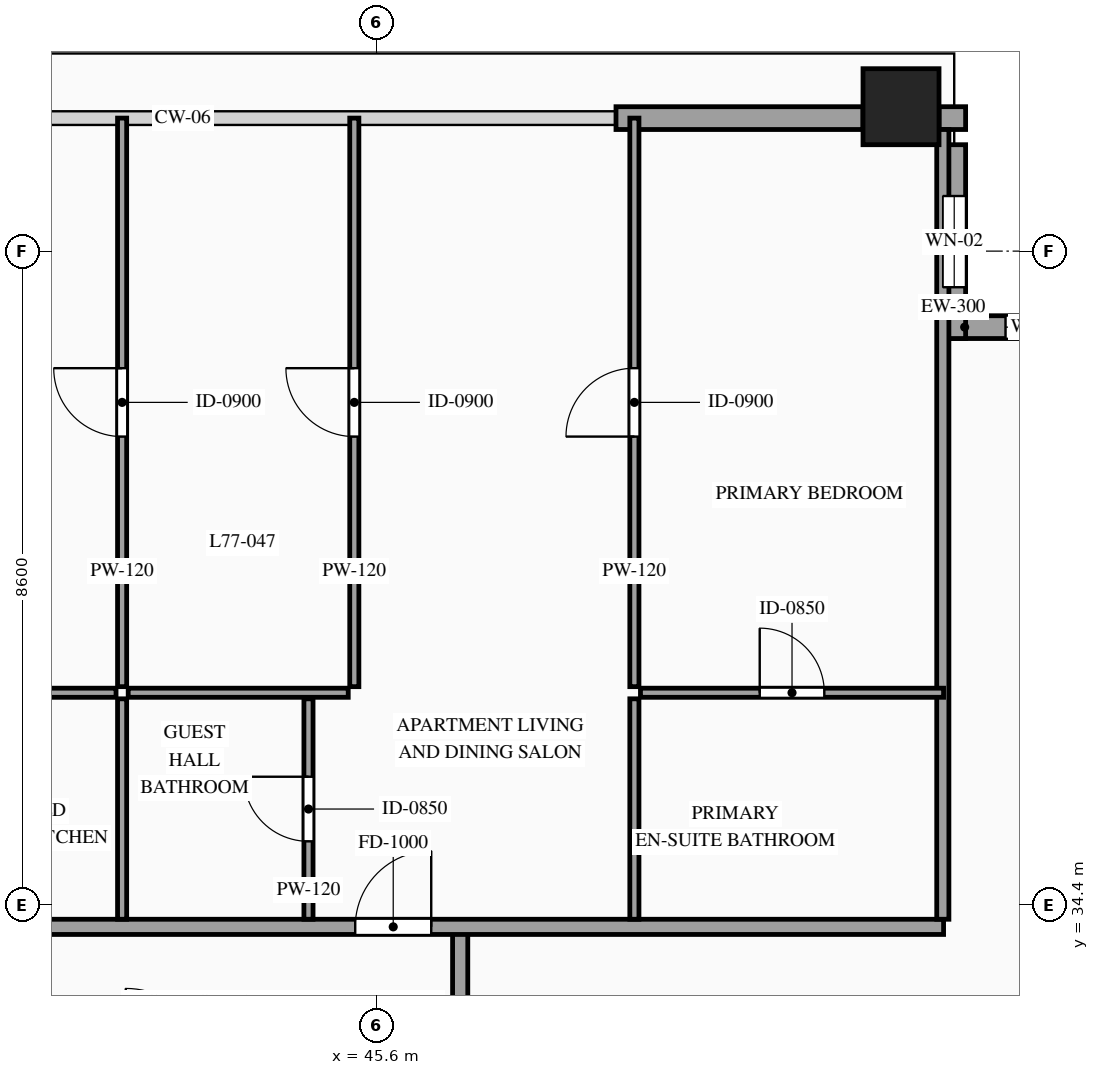
"""IFC4 building model, lengths in metres.
Left out: names, types, materials, properties, quantities, classifications, styles, units other than length and angle.
Written with IfcOpenShell. Run it as: python <this file> out.ifc"""

import sys

from ifc_helpers import new_model, si_unit, direction, frame, frame_2d, origin, origin_2d, place, context, subcontext, project, spatial, rectangle, hollow_rectangle, extrude, source, transform, mapped, element, fill, save


model = new_model("IFC4")
c1 = context("Model", 3, precision=1e-05, world=origin(), true_north=direction((0.0, 1.0)))
c2 = subcontext(c1, "Body", "Model", "MODEL_VIEW")
j1 = project(units=[si_unit("LENGTHUNIT", "METRE"), si_unit("PLANEANGLEUNIT", "RADIAN")], contexts=[c1])
p1 = place(None, origin())
s1 = spatial("IfcSite", under=j1, at=p1, CompositionType="ELEMENT")
p2 = place(p1, origin())
s2 = spatial("IfcBuilding", under=s1, at=p2, CompositionType="ELEMENT")
p3 = place(p2, frame((0.0, 0.0, 289.1)))
s3 = spatial("IfcBuildingStorey", under=s2, at=p3, CompositionType="ELEMENT", Elevation=289.1)
m1 = source(origin(), c2, "Body", "SweptSolid", [
    extrude(hollow_rectangle(XDim=1.0, YDim=1.0, WallThickness=0.048, at=origin_2d()), origin(), (0.0, 0.0, 1.0), 3.5),
])
p4 = place(p3, frame((52.5, 44.9, 0.0), z_axis=(0.0, 0.0, 1.0), x_axis=(1.0, 0.0, 0.0)))
e1 = element("IfcColumn", 1, at=p4, inside=s3, PredefinedType="COLUMN", context=c2, shape_type="MappedRepresentation", body=[
    mapped(m1, transform((0.0, 0.0, 0.0), scale=1.0)),
])
p5 = place(p3, frame((55.6, 42.0, 0.0), z_axis=(0.0, 0.0, 1.0), x_axis=(-1.0, 0.0, 0.0)))
e2 = element("IfcWall", 2, at=p5, inside=s3, PredefinedType="SOLIDWALL", context=c2, shape_type="SweptSolid", body=[
    extrude(rectangle(XDim=2.55, YDim=0.3, at=frame_2d((1.275, 0.0))), origin(), (0.0, 0.0, 1.0), 3.28),
])
p6 = place(p5, frame((0.825, 0.0, 0.85)))
e3 = element("IfcOpeningElement", 3, at=p6, cuts=e2, PredefinedType="OPENING", context=c2, shape_type="SweptSolid", body=[
    extrude(rectangle(XDim=0.9, YDim=1.5, at=frame_2d((0.45, 0.75))), frame((0.0, 0.165, 0.0), z_axis=(0.0, -1.0, 0.0), x_axis=(1.0, 0.0, 0.0)), (0.0, 0.0, 1.0), 0.33),
])
p7 = place(p3, frame((53.2, 41.85, 0.0), z_axis=(0.0, 0.0, 1.0), x_axis=(0.0, 1.0, 0.0)))
e4 = element("IfcWall", 4, at=p7, inside=s3, PredefinedType="SOLIDWALL", context=c2, shape_type="SweptSolid", body=[
    extrude(rectangle(XDim=2.55, YDim=0.3, at=frame_2d((1.275, 0.0))), origin(), (0.0, 0.0, 1.0), 3.28),
])
p8 = place(p7, frame((0.675, 0.0, 0.85)))
e5 = element("IfcOpeningElement", 5, at=p8, cuts=e4, PredefinedType="OPENING", context=c2, shape_type="SweptSolid", body=[
    extrude(rectangle(XDim=1.2, YDim=2.1, at=frame_2d((0.6, 1.05))), frame((0.0, 0.165, 0.0), z_axis=(0.0, -1.0, 0.0), x_axis=(1.0, 0.0, 0.0)), (0.0, 0.0, 1.0), 0.33),
])
m2 = source(origin(), c2, "Body", "SweptSolid", [
    extrude(rectangle(XDim=0.35, YDim=0.3, at=frame_2d((0.175, 0.0))), origin(), (0.0, 0.0, 1.0), 3.28),
])
p9 = place(p3, frame((53.0, 44.75, 0.0), z_axis=(0.0, 0.0, 1.0), x_axis=(1.0, 0.0, 0.0)))
e6 = element("IfcWall", 6, at=p9, inside=s3, PredefinedType="SOLIDWALL", context=c2, shape_type="MappedRepresentation", body=[
    mapped(m2, transform((0.0, 0.0, 0.0), scale=1.0)),
])
m3 = source(origin(), c2, "Body", "SweptSolid", [
    extrude(rectangle(XDim=3.25, YDim=0.3, at=frame_2d((1.625, 0.0))), origin(), (0.0, 0.0, 1.0), 2.885),
])
p10 = place(p3, frame((48.75, 44.75, 0.0), z_axis=(0.0, 0.0, 1.0), x_axis=(1.0, 0.0, 0.0)))
e7 = element("IfcWall", 7, at=p10, inside=s3, PredefinedType="SOLIDWALL", context=c2, shape_type="MappedRepresentation", body=[
    mapped(m3, transform((0.0, 0.0, 0.0), scale=1.0)),
])
m4 = source(origin(), c2, "Body", "SweptSolid", [
    extrude(rectangle(XDim=1.7, YDim=0.2, at=frame_2d((0.85, 0.0))), origin(), (0.0, 0.0, 1.0), 3.28),
])
p11 = place(p3, frame((46.7, 32.35, 0.0), z_axis=(0.0, 0.0, 1.0), x_axis=(0.0, 1.0, 0.0)))
e8 = element("IfcWall", 8, at=p11, inside=s3, PredefinedType="PARTITIONING", context=c2, shape_type="MappedRepresentation", body=[
    mapped(m4, transform((0.0, 0.0, 0.0), scale=1.0)),
])
p12 = place(p3, frame((37.722, 34.11, 0.0), z_axis=(0.0, 0.0, 1.0), x_axis=(1.0, 0.0, 0.0)))
e9 = element("IfcWall", 9, at=p12, inside=s3, PredefinedType="PARTITIONING", context=c2, shape_type="SweptSolid", body=[
    extrude(rectangle(XDim=15.338, YDim=0.2, at=frame_2d((7.669, 0.0))), origin(), (0.0, 0.0, 1.0), 3.28),
])
p13 = place(p12, frame((7.597, 0.0, 0.0)))
e10 = element("IfcOpeningElement", 10, at=p13, cuts=e9, PredefinedType="OPENING", context=c2, shape_type="SweptSolid", body=[
    extrude(rectangle(XDim=1.0, YDim=2.2, at=frame_2d((0.5, 1.1))), frame((0.0, 0.115, 0.0), z_axis=(0.0, -1.0, 0.0), x_axis=(1.0, 0.0, 0.0)), (0.0, 0.0, 1.0), 0.23),
])
m5 = source(origin(), c2, "Body", "SweptSolid", [
    extrude(rectangle(XDim=10.39, YDim=0.16, at=frame_2d((5.195, 0.0))), origin(), (0.0, 0.0, 1.0), 3.28),
])
p14 = place(p3, frame((53.05, 34.21, 0.0), z_axis=(0.0, 0.0, 1.0), x_axis=(0.0, 1.0, 0.0)))
e11 = element("IfcWall", 11, at=p14, inside=s3, PredefinedType="PARTITIONING", context=c2, shape_type="MappedRepresentation", body=[
    mapped(m5, transform((0.0, 0.0, 0.0), scale=1.0)),
])
p15 = place(p3, frame((37.722, 37.19, 0.0), z_axis=(0.0, 0.0, 1.0), x_axis=(1.0, 0.0, 0.0)))
e12 = element("IfcWall", 12, at=p15, inside=s3, PredefinedType="PARTITIONING", context=c2, shape_type="SweptSolid", body=[
    extrude(rectangle(XDim=4.45, YDim=0.12, at=frame_2d((2.225, 0.0))), origin(), (0.0, 0.0, 1.0), 3.28),
])
p16 = place(p15, frame((1.8, 0.0, 0.0)))
e13 = element("IfcOpeningElement", 13, at=p16, cuts=e12, PredefinedType="OPENING", context=c2, shape_type="SweptSolid", body=[
    extrude(rectangle(XDim=0.85, YDim=2.1, at=frame_2d((0.425, 1.05))), frame((0.0, 0.075, 0.0), z_axis=(0.0, -1.0, 0.0), x_axis=(1.0, 0.0, 0.0)), (0.0, 0.0, 1.0), 0.15),
])
m6 = source(origin(), c2, "Body", "SweptSolid", [
    extrude(rectangle(XDim=2.9, YDim=0.12, at=frame_2d((1.45, 0.0))), origin(), (0.0, 0.0, 1.0), 3.28),
])
p17 = place(p3, frame((42.252, 34.21, 0.0), z_axis=(0.0, 0.0, 1.0), x_axis=(0.0, 1.0, 0.0)))
e14 = element("IfcWall", 14, at=p17, inside=s3, PredefinedType="PARTITIONING", context=c2, shape_type="MappedRepresentation", body=[
    mapped(m6, transform((0.0, 0.0, 0.0), scale=1.0)),
])
p18 = place(p3, frame((44.704, 34.21, 0.0), z_axis=(0.0, 0.0, 1.0), x_axis=(0.0, 1.0, 0.0)))
e15 = element("IfcWall", 15, at=p18, inside=s3, PredefinedType="PARTITIONING", context=c2, shape_type="SweptSolid", body=[
    extrude(rectangle(XDim=2.9, YDim=0.12, at=frame_2d((1.45, 0.0))), origin(), (0.0, 0.0, 1.0), 3.28),
])
p19 = place(p18, frame((1.025, 0.0, 0.0)))
e16 = element("IfcOpeningElement", 16, at=p19, cuts=e15, PredefinedType="OPENING", context=c2, shape_type="SweptSolid", body=[
    extrude(rectangle(XDim=0.85, YDim=2.1, at=frame_2d((0.425, 1.05))), frame((0.0, 0.075, 0.0), z_axis=(0.0, -1.0, 0.0), x_axis=(1.0, 0.0, 0.0)), (0.0, 0.0, 1.0), 0.15),
])
p20 = place(p3, frame((49.072, 37.19, 0.0), z_axis=(0.0, 0.0, 1.0), x_axis=(1.0, 0.0, 0.0)))
e17 = element("IfcWall", 17, at=p20, inside=s3, PredefinedType="PARTITIONING", context=c2, shape_type="SweptSolid", body=[
    extrude(rectangle(XDim=3.988, YDim=0.12, at=frame_2d((1.994, 0.0))), origin(), (0.0, 0.0, 1.0), 3.28),
])
p21 = place(p20, frame((1.569, 0.0, 0.0)))
e18 = element("IfcOpeningElement", 18, at=p21, cuts=e17, PredefinedType="OPENING", context=c2, shape_type="SweptSolid", body=[
    extrude(rectangle(XDim=0.85, YDim=2.1, at=frame_2d((0.425, 1.05))), frame((0.0, 0.075, 0.0), z_axis=(0.0, -1.0, 0.0), x_axis=(1.0, 0.0, 0.0)), (0.0, 0.0, 1.0), 0.15),
])
p22 = place(p3, frame((48.992, 34.21, 0.0), z_axis=(0.0, 0.0, 1.0), x_axis=(0.0, 1.0, 0.0)))
e19 = element("IfcWall", 19, at=p22, inside=s3, PredefinedType="PARTITIONING", context=c2, shape_type="MappedRepresentation", body=[
    mapped(m6, transform((0.0, 0.0, 0.0), scale=1.0)),
])
p23 = place(p3, frame((42.252, 37.27, 0.0), z_axis=(0.0, 0.0, 1.0), x_axis=(0.0, 1.0, 0.0)))
e20 = element("IfcWall", 20, at=p23, inside=s3, PredefinedType="PARTITIONING", context=c2, shape_type="SweptSolid", body=[
    extrude(rectangle(XDim=7.48, YDim=0.12, at=frame_2d((3.74, 0.0))), origin(), (0.0, 0.0, 1.0), 3.28),
])
p24 = place(p23, frame((3.29, 0.0, 0.0)))
e21 = element("IfcOpeningElement", 21, at=p24, cuts=e20, PredefinedType="OPENING", context=c2, shape_type="SweptSolid", body=[
    extrude(rectangle(XDim=0.9, YDim=2.15, at=frame_2d((0.45, 1.075))), frame((0.0, 0.075, 0.0), z_axis=(0.0, -1.0, 0.0), x_axis=(1.0, 0.0, 0.0)), (0.0, 0.0, 1.0), 0.15),
])
p25 = place(p3, frame((48.992, 37.27, 0.0), z_axis=(0.0, 0.0, 1.0), x_axis=(0.0, 1.0, 0.0)))
e22 = element("IfcWall", 22, at=p25, inside=s3, PredefinedType="PARTITIONING", context=c2, shape_type="SweptSolid", body=[
    extrude(rectangle(XDim=7.48, YDim=0.12, at=frame_2d((3.74, 0.0))), origin(), (0.0, 0.0, 1.0), 3.28),
])
p26 = place(p25, frame((3.29, 0.0, 0.0)))
e23 = element("IfcOpeningElement", 23, at=p26, cuts=e22, PredefinedType="OPENING", context=c2, shape_type="SweptSolid", body=[
    extrude(rectangle(XDim=0.9, YDim=2.15, at=frame_2d((0.45, 1.075))), frame((0.0, 0.075, 0.0), z_axis=(0.0, -1.0, 0.0), x_axis=(1.0, 0.0, 0.0)), (0.0, 0.0, 1.0), 0.15),
])
m7 = source(origin(), c2, "Body", "SweptSolid", [
    extrude(rectangle(XDim=2.895, YDim=0.12, at=frame_2d((1.448, 0.0))), origin(), (0.0, 0.0, 1.0), 3.28),
])
p27 = place(p3, frame((42.332, 37.19, 0.0), z_axis=(0.0, 0.0, 1.0), x_axis=(1.0, 0.0, 0.0)))
e24 = element("IfcWall", 24, at=p27, inside=s3, PredefinedType="PARTITIONING", context=c2, shape_type="MappedRepresentation", body=[
    mapped(m7, transform((0.0, 0.0, 0.0), scale=1.0)),
])
p28 = place(p3, frame((45.307, 37.27, 0.0), z_axis=(0.0, 0.0, 1.0), x_axis=(0.0, 1.0, 0.0)))
e25 = element("IfcWall", 25, at=p28, inside=s3, PredefinedType="PARTITIONING", context=c2, shape_type="SweptSolid", body=[
    extrude(rectangle(XDim=7.48, YDim=0.12, at=frame_2d((3.74, 0.0))), origin(), (0.0, 0.0, 1.0), 3.28),
])
p29 = place(p28, frame((3.29, 0.0, 0.0)))
e26 = element("IfcOpeningElement", 26, at=p29, cuts=e25, PredefinedType="OPENING", context=c2, shape_type="SweptSolid", body=[
    extrude(rectangle(XDim=0.9, YDim=2.15, at=frame_2d((0.45, 1.075))), frame((0.0, 0.075, 0.0), z_axis=(0.0, -1.0, 0.0), x_axis=(1.0, 0.0, 0.0)), (0.0, 0.0, 1.0), 0.15),
])
m8 = source(origin(), c2, "Body", "SweptSolid", [
    extrude(rectangle(XDim=0.9, YDim=1.5, at=frame_2d((0.45, 0.75))), frame((0.0, 0.03, 0.0), z_axis=(0.0, -1.0, 0.0), x_axis=(1.0, 0.0, 0.0)), (0.0, 0.0, 1.0), 0.06),
])
p30 = place(p6, origin())
e27 = element("IfcWindow", 27, at=p30, inside=s3, PartitioningType="SINGLE_PANEL", PredefinedType="WINDOW", context=c2, shape_type="MappedRepresentation", body=[
    mapped(m8, transform((0.0, 0.0, 0.0), scale=1.0)),
])
fill(e3, e27)
m9 = source(origin(), c2, "Body", "SweptSolid", [
    extrude(rectangle(XDim=1.2, YDim=2.1, at=frame_2d((0.6, 1.05))), frame((0.0, 0.03, 0.0), z_axis=(0.0, -1.0, 0.0), x_axis=(1.0, 0.0, 0.0)), (0.0, 0.0, 1.0), 0.06),
])
p31 = place(p8, origin())
e28 = element("IfcWindow", 28, at=p31, inside=s3, PartitioningType="SINGLE_PANEL", PredefinedType="WINDOW", context=c2, shape_type="MappedRepresentation", body=[
    mapped(m9, transform((0.0, 0.0, 0.0), scale=1.0)),
])
fill(e5, e28)
m10 = source(origin(), c2, "Body", "SweptSolid", [
    extrude(rectangle(XDim=1.0, YDim=2.2, at=frame_2d((0.5, 1.1))), frame((0.0, 0.025, 0.0), z_axis=(0.0, -1.0, 0.0), x_axis=(1.0, 0.0, 0.0)), (0.0, 0.0, 1.0), 0.05),
])
p32 = place(p13, origin())
e29 = element("IfcDoor", 29, at=p32, inside=s3, OperationType="SINGLE_SWING_RIGHT", PredefinedType="DOOR", context=c2, shape_type="MappedRepresentation", body=[
    mapped(m10, transform((0.0, 0.0, 0.0), scale=1.0)),
])
fill(e10, e29)
m11 = source(origin(), c2, "Body", "SweptSolid", [
    extrude(rectangle(XDim=0.85, YDim=2.1, at=frame_2d((0.425, 1.05))), frame((0.0, 0.025, 0.0), z_axis=(0.0, -1.0, 0.0), x_axis=(1.0, 0.0, 0.0)), (0.0, 0.0, 1.0), 0.05),
])
p33 = place(p19, origin())
e30 = element("IfcDoor", 30, at=p33, inside=s3, OperationType="SINGLE_SWING_RIGHT", PredefinedType="DOOR", context=c2, shape_type="MappedRepresentation", body=[
    mapped(m11, transform((0.0, 0.0, 0.0), scale=1.0)),
])
fill(e16, e30)
p34 = place(p21, origin())
e31 = element("IfcDoor", 31, at=p34, inside=s3, OperationType="SINGLE_SWING_LEFT", PredefinedType="DOOR", context=c2, shape_type="MappedRepresentation", body=[
    mapped(m11, transform((0.0, 0.0, 0.0), scale=1.0)),
])
fill(e18, e31)
m12 = source(origin(), c2, "Body", "SweptSolid", [
    extrude(rectangle(XDim=0.9, YDim=2.15, at=frame_2d((0.45, 1.075))), frame((0.0, 0.025, 0.0), z_axis=(0.0, -1.0, 0.0), x_axis=(1.0, 0.0, 0.0)), (0.0, 0.0, 1.0), 0.05),
])
p35 = place(p24, origin())
e32 = element("IfcDoor", 32, at=p35, inside=s3, OperationType="SINGLE_SWING_RIGHT", PredefinedType="DOOR", context=c2, shape_type="MappedRepresentation", body=[
    mapped(m12, transform((0.0, 0.0, 0.0), scale=1.0)),
])
fill(e21, e32)
p36 = place(p26, origin())
e33 = element("IfcDoor", 33, at=p36, inside=s3, OperationType="SINGLE_SWING_LEFT", PredefinedType="DOOR", context=c2, shape_type="MappedRepresentation", body=[
    mapped(m12, transform((0.0, 0.0, 0.0), scale=1.0)),
])
fill(e23, e33)
p37 = place(p29, origin())
e34 = element("IfcDoor", 34, at=p37, inside=s3, OperationType="SINGLE_SWING_RIGHT", PredefinedType="DOOR", context=c2, shape_type="MappedRepresentation", body=[
    mapped(m12, transform((0.0, 0.0, 0.0), scale=1.0)),
])
fill(e26, e34)
save(model, sys.argv[1])
